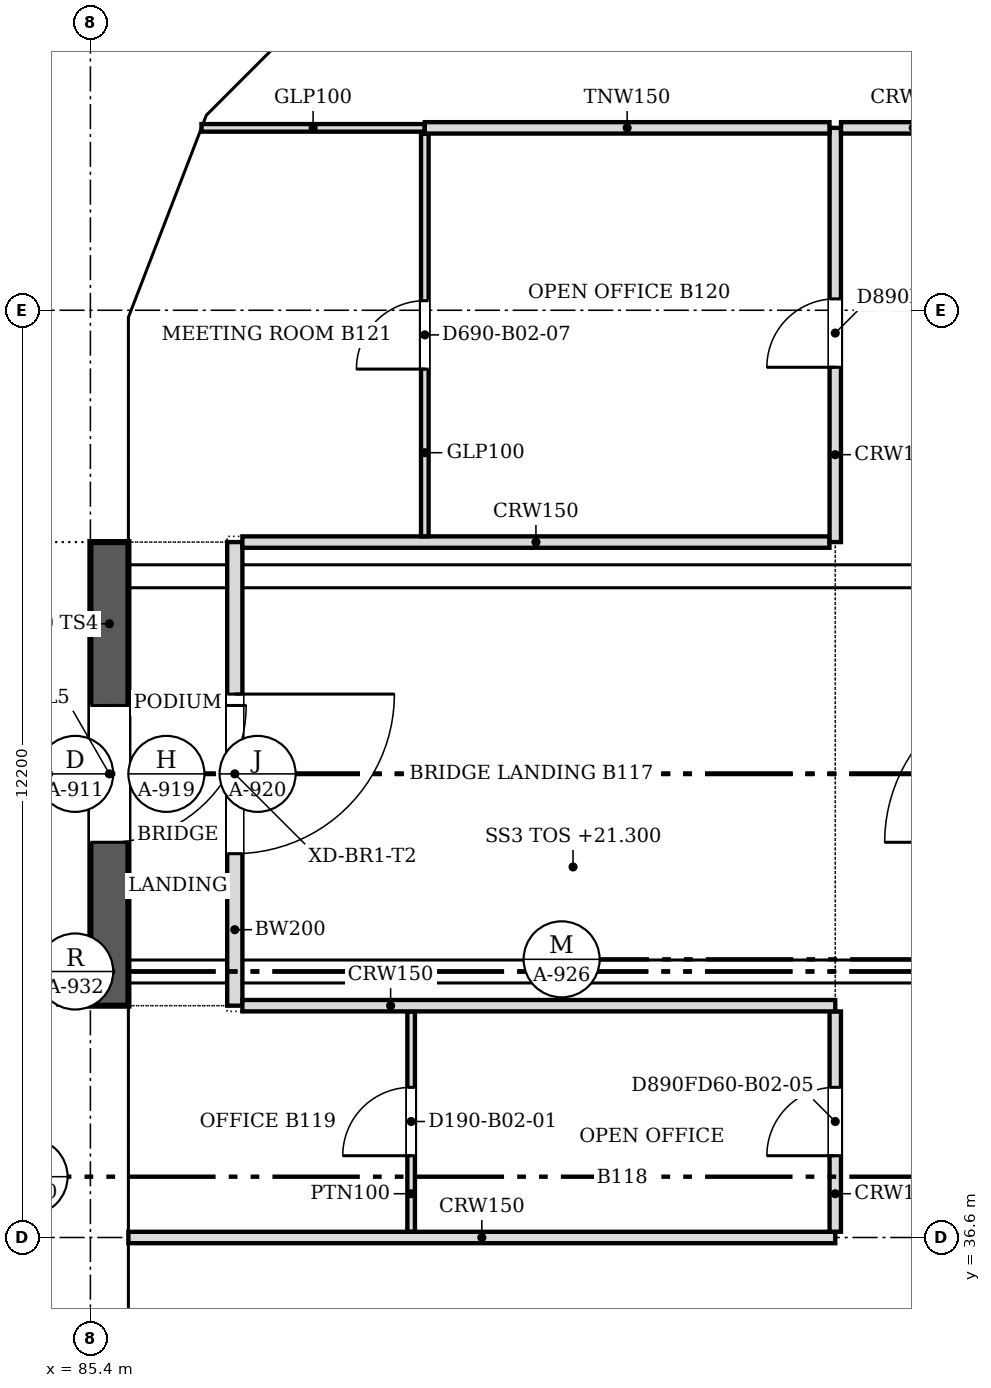
"""IFC4 building model, lengths in metres.
Left out: names, types, materials, properties, quantities, classifications, styles, units other than length and angle.
Written with IfcOpenShell. Run it as: python <this file> out.ifc"""

import sys

from ifc_helpers import new_model, si_unit, direction, frame, frame_2d, origin, place, context, subcontext, project, spatial, polyline, rectangle, outline, extrude, faceted_brep, source, transform, mapped, element, fill, save


model = new_model("IFC4")
c1 = context("Model", 3, precision=1e-05, world=origin(), true_north=direction((0.0, 1.0)))
c2 = subcontext(c1, "Body", "Model", "MODEL_VIEW")
j1 = project(units=[si_unit("LENGTHUNIT", "METRE"), si_unit("PLANEANGLEUNIT", "RADIAN")], contexts=[c1])
p1 = place(None, origin())
s1 = spatial("IfcSite", under=j1, at=p1, CompositionType="ELEMENT")
p2 = place(p1, origin())
s2 = spatial("IfcBuilding", under=s1, at=p2, CompositionType="ELEMENT")
p3 = place(p2, frame((0.0, 0.0, 21.3)))
s3 = spatial("IfcBuildingStorey", under=s2, at=p3, CompositionType="ELEMENT", Elevation=21.3)
m1 = source(origin(), c2, "Body", "Brep", [
    faceted_brep([(0.053, -0.25, 0.0), (2.997, -0.25, 4.5), (0.053, -0.25, 9.0), (0.0, -0.25, 8.919), (0.0, -0.25, 0.081), (0.106, 0.25, 8.919), (2.944, 0.25, 4.581), (2.944, 0.25, 4.419), (0.106, 0.25, 0.081), (2.997, 0.0, 4.5), (0.053, 0.0, 0.0), (0.053, 0.0, 9.0)], [[[0, 1, 2, 3, 4]], [[5, 6, 7, 8]], [[8, 7, 9, 1, 0, 10]], [[6, 5, 11, 2, 1, 9]], [[3, 2, 11]], [[10, 0, 4]], [[8, 10, 4, 3, 11, 5]], [[9, 7, 6]]]),
])
p4 = place(p3, frame((88.831, 53.625, -4.5), z_axis=(0.0, 0.0, 1.0), x_axis=(-0.707147509625, -0.707066050402, 0.0)))
e1 = element("IfcWall", 1, at=p4, inside=s3, PredefinedType="SOLIDWALL", context=c2, shape_type="MappedRepresentation", body=[
    mapped(m1, transform((0.0, 0.0, 0.0), scale=1.0)),
])
m2 = source(origin(), c2, "Body", "SweptSolid", [
    extrude(outline(polyline([(0.253, 0.762), (2.698, 4.5), (0.253, 8.238), (0.253, 0.762)])), frame((0.0, 0.26, 0.0), z_axis=(0.0, -1.0, 0.0), x_axis=(1.0, 0.0, 0.0)), (0.0, 0.0, 1.0), 0.52),
])
p5 = place(p4, origin())
e2 = element("IfcOpeningElement", 2, at=p5, cuts=e1, PredefinedType="OPENING", context=c2, shape_type="MappedRepresentation", body=[
    mapped(m2, transform((0.0, 0.0, 0.0), scale=1.0)),
])
m3 = source(origin(), c2, "Body", "Brep", [
    faceted_brep([(2.95, -0.25, 0.0), (2.997, -0.25, 0.07), (2.997, -0.25, 8.93), (2.95, -0.25, 9.0), (0.0, -0.25, 4.5), (0.053, 0.25, 4.581), (2.904, 0.25, 8.929), (2.904, 0.25, 0.071), (0.053, 0.25, 4.419), (2.95, 0.0, 0.0), (2.95, 0.0, 9.0), (0.0, 0.0, 4.5)], [[[0, 1, 2, 3, 4]], [[5, 6, 7, 8]], [[1, 0, 9]], [[10, 3, 2]], [[6, 5, 11, 4, 3, 10]], [[8, 7, 9, 0, 4, 11]], [[8, 11, 5]], [[1, 9, 7, 6, 10, 2]]]),
])
p6 = place(p3, frame((86.712, 51.506, -4.5), z_axis=(0.0, 0.0, 1.0), x_axis=(-0.359874094142, -0.933000876937, 0.0)))
e3 = element("IfcWall", 3, at=p6, inside=s3, PredefinedType="SOLIDWALL", context=c2, shape_type="MappedRepresentation", body=[
    mapped(m3, transform((0.0, 0.0, 0.0), scale=1.0)),
])
m4 = source(origin(), c2, "Body", "SweptSolid", [
    extrude(outline(polyline([(2.75, 8.239), (0.299, 4.5), (2.75, 0.761), (2.75, 8.239)])), frame((0.0, 0.26, 0.0), z_axis=(0.0, -1.0, 0.0), x_axis=(1.0, 0.0, 0.0)), (0.0, 0.0, 1.0), 0.52),
])
p7 = place(p6, origin())
e4 = element("IfcOpeningElement", 4, at=p7, cuts=e3, PredefinedType="OPENING", context=c2, shape_type="MappedRepresentation", body=[
    mapped(m4, transform((0.0, 0.0, 0.0), scale=1.0)),
])
m5 = source(origin(), c2, "Body", "Brep", [
    faceted_brep([(0.047, -0.25, 0.0), (3.05, -0.25, 4.5), (0.047, -0.25, 9.0), (0.0, -0.25, 8.929), (0.0, -0.25, 0.071), (0.093, 0.25, 8.93), (3.05, 0.25, 4.5), (0.093, 0.25, 0.07), (0.047, 0.0, 0.0), (0.047, 0.0, 9.0)], [[[0, 1, 2, 3, 4]], [[5, 6, 7]], [[7, 6, 1, 0, 8]], [[6, 5, 9, 2, 1]], [[3, 2, 9]], [[8, 0, 4]], [[7, 8, 4, 3, 9, 5]]]),
])
p8 = place(p3, frame((85.65, 48.8, -4.5), z_axis=(0.0, 0.0, 1.0), x_axis=(0.0, -1.0, 0.0)))
e5 = element("IfcWall", 5, at=p8, inside=s3, PredefinedType="SOLIDWALL", context=c2, shape_type="MappedRepresentation", body=[
    mapped(m5, transform((0.0, 0.0, 0.0), scale=1.0)),
])
m6 = source(origin(), c2, "Body", "SweptSolid", [
    extrude(outline(polyline([(0.247, 0.75), (2.75, 4.5), (0.247, 8.25), (0.247, 0.75)])), frame((0.0, 0.26, 0.0), z_axis=(0.0, -1.0, 0.0), x_axis=(1.0, 0.0, 0.0)), (0.0, 0.0, 1.0), 0.52),
])
p9 = place(p8, origin())
e6 = element("IfcOpeningElement", 6, at=p9, cuts=e5, PredefinedType="OPENING", context=c2, shape_type="MappedRepresentation", body=[
    mapped(m6, transform((0.0, 0.0, 0.0), scale=1.0)),
])
m7 = source(origin(), c2, "Body", "SweptSolid", [
    extrude(outline(polyline([(3.05, 0.0), (6.1, 4.5), (3.05, 9.0), (0.0, 4.5), (3.05, 0.0)])), frame((0.0, 0.25, 0.0), z_axis=(0.0, -1.0, 0.0), x_axis=(1.0, 0.0, 0.0)), (0.0, 0.0, 1.0), 0.5),
])
p10 = place(p3, frame((85.65, 45.75, -4.5), z_axis=(0.0, 0.0, 1.0), x_axis=(0.0, -1.0, 0.0)))
e7 = element("IfcWall", 7, at=p10, inside=s3, PredefinedType="SOLIDWALL", context=c2, shape_type="MappedRepresentation", body=[
    mapped(m7, transform((0.0, 0.0, 0.0), scale=1.0)),
])
m8 = source(origin(), c2, "Body", "SweptSolid", [
    extrude(rectangle(XDim=1.8, YDim=2.4, at=frame_2d((0.9, 1.2))), frame((0.0, 0.26, 0.0), z_axis=(0.0, -1.0, 0.0), x_axis=(1.0, 0.0, 0.0)), (0.0, 0.0, 1.0), 0.52),
])
p11 = place(p10, frame((2.15, 0.0, 4.5)))
e8 = element("IfcOpeningElement", 8, at=p11, cuts=e7, PredefinedType="OPENING", context=c2, shape_type="MappedRepresentation", body=[
    mapped(m8, transform((0.0, 0.0, 0.0), scale=1.0)),
])
m9 = source(origin(), c2, "Body", "Brep", [
    faceted_brep([(3.05, -0.25, 0.0), (6.1, -0.25, 4.5), (6.1, -0.25, 4.5), (3.05, -0.25, 9.0), (0.0, -0.25, 4.5), (0.0, 0.25, 4.5), (3.05, 0.25, 9.0), (6.1, 0.25, 4.5), (6.1, 0.25, 4.5), (3.05, 0.25, 0.0)], [[[0, 1, 2, 3, 4]], [[5, 6, 7, 8, 9]], [[9, 8, 1, 0]], [[7, 6, 3, 2]], [[6, 5, 4, 3]], [[5, 9, 0, 4]], [[1, 8, 7, 2]]]),
])
p12 = place(p3, frame((85.65, 39.65, -4.5), z_axis=(0.0, 0.0, 1.0), x_axis=(0.0, -1.0, 0.0)))
e9 = element("IfcWall", 9, at=p12, inside=s3, PredefinedType="SOLIDWALL", context=c2, shape_type="MappedRepresentation", body=[
    mapped(m9, transform((0.0, 0.0, 0.0), scale=1.0)),
])
m10 = source(origin(), c2, "Body", "SweptSolid", [
    extrude(outline(polyline([(3.05, 0.446), (5.798, 4.5), (3.05, 8.554), (0.302, 4.5), (3.05, 0.446)])), frame((0.0, 0.26, 0.0), z_axis=(0.0, -1.0, 0.0), x_axis=(1.0, 0.0, 0.0)), (0.0, 0.0, 1.0), 0.52),
])
p13 = place(p12, origin())
e10 = element("IfcOpeningElement", 10, at=p13, cuts=e9, PredefinedType="OPENING", context=c2, shape_type="MappedRepresentation", body=[
    mapped(m10, transform((0.0, 0.0, 0.0), scale=1.0)),
])
m11 = source(origin(), c2, "Body", "Brep", [
    faceted_brep([(2.944, -0.25, 0.0), (2.997, -0.25, 0.081), (2.997, -0.25, 4.5), (0.0, -0.25, 4.5), (0.053, 0.25, 4.5), (2.891, 0.25, 4.5), (2.891, 0.25, 0.081), (0.053, 0.25, 4.419), (2.944, 0.0, 0.0), (0.0, 0.0, 4.5)], [[[0, 1, 2, 3]], [[4, 5, 6, 7]], [[1, 0, 8]], [[5, 4, 9, 3, 2]], [[7, 6, 8, 0, 3, 9]], [[7, 9, 4]], [[1, 8, 6, 5, 2]]]),
])
p14 = place(p3, frame((88.794, 53.588, 0.0), z_axis=(0.0, 0.0, 1.0), x_axis=(-0.707066050402, -0.707147509625, 0.0)))
e11 = element("IfcWall", 11, at=p14, inside=s3, PredefinedType="SOLIDWALL", context=c2, shape_type="MappedRepresentation", body=[
    mapped(m11, transform((0.0, 0.0, 0.0), scale=1.0)),
])
m12 = source(origin(), c2, "Body", "SweptSolid", [
    extrude(outline(polyline([(2.744, 4.25), (0.462, 4.25), (2.744, 0.762), (2.744, 4.25)])), frame((0.0, 0.26, 0.0), z_axis=(0.0, -1.0, 0.0), x_axis=(1.0, 0.0, 0.0)), (0.0, 0.0, 1.0), 0.52),
])
p15 = place(p14, origin())
e12 = element("IfcOpeningElement", 12, at=p15, cuts=e11, PredefinedType="OPENING", context=c2, shape_type="MappedRepresentation", body=[
    mapped(m12, transform((0.0, 0.0, 0.0), scale=1.0)),
])
m13 = source(origin(), c2, "Body", "Brep", [
    faceted_brep([(0.053, -0.25, 0.0), (3.003, -0.25, 4.5), (0.0, -0.25, 4.5), (0.0, -0.25, 0.081), (0.106, 0.25, 4.5), (2.957, 0.25, 4.5), (2.957, 0.25, 4.429), (0.106, 0.25, 0.081), (3.003, 0.0, 4.5), (0.053, 0.0, 0.0)], [[[0, 1, 2, 3]], [[4, 5, 6, 7]], [[7, 6, 8, 1, 0, 9]], [[5, 4, 2, 1, 8]], [[9, 0, 3]], [[7, 9, 3, 2, 4]], [[6, 5, 8]]]),
])
p16 = place(p3, frame((86.731, 51.556, 0.0), z_axis=(0.0, 0.0, 1.0), x_axis=(-0.359855894603, -0.933007896601, 0.0)))
e13 = element("IfcWall", 13, at=p16, inside=s3, PredefinedType="SOLIDWALL", context=c2, shape_type="MappedRepresentation", body=[
    mapped(m13, transform((0.0, 0.0, 0.0), scale=1.0)),
])
m14 = source(origin(), c2, "Body", "SweptSolid", [
    extrude(outline(polyline([(0.253, 0.761), (2.541, 4.25), (0.253, 4.25), (0.253, 0.761)])), frame((0.0, 0.26, 0.0), z_axis=(0.0, -1.0, 0.0), x_axis=(1.0, 0.0, 0.0)), (0.0, 0.0, 1.0), 0.52),
])
p17 = place(p16, origin())
e14 = element("IfcOpeningElement", 14, at=p17, cuts=e13, PredefinedType="OPENING", context=c2, shape_type="MappedRepresentation", body=[
    mapped(m14, transform((0.0, 0.0, 0.0), scale=1.0)),
])
m15 = source(origin(), c2, "Body", "Brep", [
    faceted_brep([(3.003, -0.25, 0.0), (4.803, -0.25, 2.656), (4.803, -0.25, 4.5), (0.0, -0.25, 4.5), (0.047, 0.25, 4.5), (4.803, 0.25, 4.5), (4.803, 0.25, 2.656), (3.003, 0.25, 0.0), (0.047, 0.25, 4.43), (0.0, 0.0, 4.5)], [[[0, 1, 2, 3]], [[4, 5, 6, 7, 8]], [[7, 6, 1, 0]], [[5, 4, 9, 3, 2]], [[8, 7, 0, 3, 9]], [[8, 9, 4]], [[1, 6, 5, 2]]]),
])
p18 = place(p3, frame((85.65, 48.753, 0.0), z_axis=(0.0, 0.0, 1.0), x_axis=(0.0, -1.0, 0.0)))
e15 = element("IfcWall", 15, at=p18, inside=s3, PredefinedType="SOLIDWALL", context=c2, shape_type="MappedRepresentation", body=[
    mapped(m15, transform((0.0, 0.0, 0.0), scale=1.0)),
])
m16 = source(origin(), c2, "Body", "SweptSolid", [
    extrude(outline(polyline([(3.005, 0.448), (4.803, 3.101), (4.803, 4.25), (0.468, 4.25), (3.005, 0.448)])), frame((0.0, 0.26, 0.0), z_axis=(0.0, -1.0, 0.0), x_axis=(1.0, 0.0, 0.0)), (0.0, 0.0, 1.0), 0.52),
])
p19 = place(p18, origin())
e16 = element("IfcOpeningElement", 16, at=p19, cuts=e15, PredefinedType="OPENING", context=c2, shape_type="MappedRepresentation", body=[
    mapped(m16, transform((0.0, 0.0, 0.0), scale=1.0)),
])
m17 = source(origin(), c2, "Body", "Brep", [
    faceted_brep([(1.8, -0.25, 0.0), (4.85, -0.25, 4.5), (4.85, -0.25, 4.5), (0.0, -0.25, 4.5), (0.0, -0.25, 2.656), (0.0, 0.25, 2.656), (0.0, 0.25, 4.5), (4.85, 0.25, 4.5), (4.85, 0.25, 4.5), (1.8, 0.25, 0.0)], [[[0, 1, 2, 3, 4]], [[5, 6, 7, 8, 9]], [[9, 8, 1, 0]], [[7, 6, 3, 2]], [[6, 5, 4, 3]], [[5, 9, 0, 4]], [[1, 8, 7, 2]]]),
])
p20 = place(p3, frame((85.65, 41.45, 0.0), z_axis=(0.0, 0.0, 1.0), x_axis=(0.0, -1.0, 0.0)))
e17 = element("IfcWall", 17, at=p20, inside=s3, PredefinedType="SOLIDWALL", context=c2, shape_type="MappedRepresentation", body=[
    mapped(m17, transform((0.0, 0.0, 0.0), scale=1.0)),
])
m18 = source(origin(), c2, "Body", "SweptSolid", [
    extrude(outline(polyline([(1.8, 0.446), (4.379, 4.25), (0.0, 4.25), (0.0, 3.101), (1.8, 0.446)])), frame((0.0, 0.26, 0.0), z_axis=(0.0, -1.0, 0.0), x_axis=(1.0, 0.0, 0.0)), (0.0, 0.0, 1.0), 0.52),
])
p21 = place(p20, origin())
e18 = element("IfcOpeningElement", 18, at=p21, cuts=e17, PredefinedType="OPENING", context=c2, shape_type="MappedRepresentation", body=[
    mapped(m18, transform((0.0, 0.0, 0.0), scale=1.0)),
])
m19 = source(origin(), c2, "Body", "SweptSolid", [
    extrude(outline(polyline([(3.05, 0.0), (6.1, 4.5), (0.0, 4.5), (3.05, 0.0)])), frame((0.0, 0.25, 0.0), z_axis=(0.0, -1.0, 0.0), x_axis=(1.0, 0.0, 0.0)), (0.0, 0.0, 1.0), 0.5),
])
p22 = place(p3, frame((85.65, 36.6, 0.0), z_axis=(0.0, 0.0, 1.0), x_axis=(0.0, -1.0, 0.0)))
e19 = element("IfcWall", 19, at=p22, inside=s3, PredefinedType="SOLIDWALL", context=c2, shape_type="MappedRepresentation", body=[
    mapped(m19, transform((0.0, 0.0, 0.0), scale=1.0)),
])
m20 = source(origin(), c2, "Body", "SweptSolid", [
    extrude(outline(polyline([(3.05, 0.446), (5.629, 4.25), (0.471, 4.25), (3.05, 0.446)])), frame((0.0, 0.26, 0.0), z_axis=(0.0, -1.0, 0.0), x_axis=(1.0, 0.0, 0.0)), (0.0, 0.0, 1.0), 0.52),
])
p23 = place(p22, origin())
e20 = element("IfcOpeningElement", 20, at=p23, cuts=e19, PredefinedType="OPENING", context=c2, shape_type="MappedRepresentation", body=[
    mapped(m20, transform((0.0, 0.0, 0.0), scale=1.0)),
])
p24 = place(p3, frame((87.3, 45.75, 0.0), z_axis=(0.0, 0.0, 1.0), x_axis=(0.0, -1.0, 0.0)))
e21 = element("IfcWall", 21, at=p24, inside=s3, PredefinedType="PARTITIONING", context=c2, shape_type="SweptSolid", body=[
    extrude(rectangle(XDim=6.1, YDim=0.2, at=frame_2d((3.05, 0.0))), origin(), (0.0, 0.0, 1.0), 3.767),
])
m21 = source(origin(), c2, "Body", "SweptSolid", [
    extrude(rectangle(XDim=2.1, YDim=2.1, at=frame_2d((1.05, 1.05))), frame((0.0, 0.11, 0.0), z_axis=(0.0, -1.0, 0.0), x_axis=(1.0, 0.0, 0.0)), (0.0, 0.0, 1.0), 0.22),
])
p25 = place(p24, frame((2.0, 0.0, 0.0)))
e22 = element("IfcOpeningElement", 22, at=p25, cuts=e21, PredefinedType="OPENING", context=c2, shape_type="MappedRepresentation", body=[
    mapped(m21, transform((0.0, 0.0, 0.0), scale=1.0)),
])
p26 = place(p3, frame((85.9, 36.6, 0.0), z_axis=(0.0, 0.0, 1.0), x_axis=(1.0, 0.0, 0.0)))
e23 = element("IfcWall", 23, at=p26, inside=s3, PredefinedType="PARTITIONING", context=c2, shape_type="SweptSolid", body=[
    extrude(rectangle(XDim=9.3, YDim=0.15, at=frame_2d((4.65, 0.0))), origin(), (0.0, 0.0, 1.0), 3.767),
])
p27 = place(p3, frame((89.62, 36.676, 0.0), z_axis=(0.0, 0.0, 1.0), x_axis=(0.0, 1.0, 0.0)))
e24 = element("IfcWall", 24, at=p27, inside=s3, PredefinedType="PARTITIONING", context=c2, shape_type="SweptSolid", body=[
    extrude(rectangle(XDim=2.898, YDim=0.1, at=frame_2d((1.449, 0.0))), origin(), (0.0, 0.0, 1.0), 3.767),
])
m22 = source(origin(), c2, "Body", "SweptSolid", [
    extrude(rectangle(XDim=0.9, YDim=2.1, at=frame_2d((0.45, 1.05))), frame((0.0, 0.06, 0.0), z_axis=(0.0, -1.0, 0.0), x_axis=(1.0, 0.0, 0.0)), (0.0, 0.0, 1.0), 0.12),
])
p28 = place(p27, frame((1.0, 0.0, 0.0)))
e25 = element("IfcOpeningElement", 25, at=p28, cuts=e24, PredefinedType="OPENING", context=c2, shape_type="MappedRepresentation", body=[
    mapped(m22, transform((0.0, 0.0, 0.0), scale=1.0)),
])
p29 = place(p3, frame((95.2, 36.676, 0.0), z_axis=(0.0, 0.0, 1.0), x_axis=(0.0, 1.0, 0.0)))
e26 = element("IfcWall", 26, at=p29, inside=s3, PredefinedType="PARTITIONING", context=c2, shape_type="SweptSolid", body=[
    extrude(rectangle(XDim=2.898, YDim=0.15, at=frame_2d((1.449, 0.0))), origin(), (0.0, 0.0, 1.0), 3.767),
])
m23 = source(origin(), c2, "Body", "SweptSolid", [
    extrude(rectangle(XDim=0.9, YDim=2.1, at=frame_2d((0.45, 1.05))), frame((0.0, 0.085, 0.0), z_axis=(0.0, -1.0, 0.0), x_axis=(1.0, 0.0, 0.0)), (0.0, 0.0, 1.0), 0.17),
])
p30 = place(p29, frame((1.0, 0.0, 0.0)))
e27 = element("IfcOpeningElement", 27, at=p30, cuts=e26, PredefinedType="OPENING", context=c2, shape_type="MappedRepresentation", body=[
    mapped(m23, transform((0.0, 0.0, 0.0), scale=1.0)),
])
p31 = place(p3, frame((87.4, 39.65, 0.0), z_axis=(0.0, 0.0, 1.0), x_axis=(1.0, 0.0, 0.0)))
e28 = element("IfcWall", 28, at=p31, inside=s3, PredefinedType="PARTITIONING", context=c2, shape_type="SweptSolid", body=[
    extrude(rectangle(XDim=7.8, YDim=0.15, at=frame_2d((3.9, 0.0))), origin(), (0.0, 0.0, 1.0), 3.767),
])
p32 = place(p3, frame((87.4, 45.75, 0.0), z_axis=(0.0, 0.0, 1.0), x_axis=(1.0, 0.0, 0.0)))
e29 = element("IfcWall", 29, at=p32, inside=s3, PredefinedType="PARTITIONING", context=c2, shape_type="SweptSolid", body=[
    extrude(rectangle(XDim=7.724, YDim=0.15, at=frame_2d((3.862, 0.0))), origin(), (0.0, 0.0, 1.0), 3.767),
])
p33 = place(p3, frame((95.2, 45.75, 0.0), z_axis=(0.0, 0.0, 1.0), x_axis=(0.0, 1.0, 0.0)))
e30 = element("IfcWall", 30, at=p33, inside=s3, PredefinedType="PARTITIONING", context=c2, shape_type="SweptSolid", body=[
    extrude(rectangle(XDim=5.45, YDim=0.15, at=frame_2d((2.725, 0.0))), origin(), (0.0, 0.0, 1.0), 3.767),
])
p34 = place(p33, frame((2.3, 0.0, 0.0)))
e31 = element("IfcOpeningElement", 31, at=p34, cuts=e30, PredefinedType="OPENING", context=c2, shape_type="MappedRepresentation", body=[
    mapped(m23, transform((0.0, 0.0, 0.0), scale=1.0)),
])
p35 = place(p3, frame((89.8, 45.826, 0.0), z_axis=(0.0, 0.0, 1.0), x_axis=(0.0, 1.0, 0.0)))
e32 = element("IfcWall", 32, at=p35, inside=s3, PredefinedType="PARTITIONING", context=c2, shape_type="SweptSolid", body=[
    extrude(rectangle(XDim=5.298, YDim=0.1, at=frame_2d((2.649, 0.0))), origin(), (0.0, 0.0, 1.0), 3.767),
])
p36 = place(p35, frame((2.2, 0.0, 0.0)))
e33 = element("IfcOpeningElement", 33, at=p36, cuts=e32, PredefinedType="OPENING", context=c2, shape_type="MappedRepresentation", body=[
    mapped(m22, transform((0.0, 0.0, 0.0), scale=1.0)),
])
p37 = place(p3, frame((86.862, 51.2, 0.0), z_axis=(0.0, 0.0, 1.0), x_axis=(1.0, 0.0, 0.0)))
e34 = element("IfcWall", 34, at=p37, inside=s3, PredefinedType="PARTITIONING", context=c2, shape_type="SweptSolid", body=[
    extrude(rectangle(XDim=2.937, YDim=0.1, at=frame_2d((1.469, 0.0))), origin(), (0.0, 0.0, 1.0), 3.767),
])
p38 = place(p3, frame((89.8, 51.2, 0.0), z_axis=(0.0, 0.0, 1.0), x_axis=(1.0, 0.0, 0.0)))
e35 = element("IfcWall", 35, at=p38, inside=s3, PredefinedType="PARTITIONING", context=c2, shape_type="SweptSolid", body=[
    extrude(rectangle(XDim=5.324, YDim=0.15, at=frame_2d((2.662, 0.0))), origin(), (0.0, 0.0, 1.0), 3.767),
])
p39 = place(p3, frame((95.276, 51.2, 0.0), z_axis=(0.0, 0.0, 1.0), x_axis=(1.0, 0.0, 0.0)))
e36 = element("IfcWall", 36, at=p39, inside=s3, PredefinedType="PARTITIONING", context=c2, shape_type="SweptSolid", body=[
    extrude(rectangle(XDim=4.724, YDim=0.15, at=frame_2d((2.362, 0.0))), origin(), (0.0, 0.0, 1.0), 3.767),
])
m24 = source(origin(), c2, "Body", "SweptSolid", [
    extrude(rectangle(XDim=1.0, YDim=2.1, at=frame_2d((0.5, 1.05))), frame((0.0, 0.085, 0.0), z_axis=(0.0, -1.0, 0.0), x_axis=(1.0, 0.0, 0.0)), (0.0, 0.0, 1.0), 0.17),
])
p40 = place(p39, frame((1.9, 0.0, 0.0)))
e37 = element("IfcOpeningElement", 37, at=p40, cuts=e36, PredefinedType="OPENING", context=c2, shape_type="MappedRepresentation", body=[
    mapped(m24, transform((0.0, 0.0, 0.0), scale=1.0)),
])
m25 = source(origin(), c2, "Body", "SweptSolid", [
    extrude(rectangle(XDim=1.8, YDim=2.4, at=frame_2d((0.9, 1.2))), frame((0.0, 0.03, 0.0), z_axis=(0.0, -1.0, 0.0), x_axis=(1.0, 0.0, 0.0)), (0.0, 0.0, 1.0), 0.06),
])
p41 = place(p11, origin())
e38 = element("IfcDoor", 38, at=p41, inside=s3, OperationType="DOUBLE_DOOR_SINGLE_SWING", PredefinedType="DOOR", context=c2, shape_type="MappedRepresentation", body=[
    mapped(m25, transform((0.0, 0.0, 0.0), scale=1.0)),
])
fill(e8, e38)
m26 = source(origin(), c2, "Body", "SweptSolid", [
    extrude(rectangle(XDim=2.1, YDim=2.1, at=frame_2d((1.05, 1.05))), frame((0.0, 0.025, 0.0), z_axis=(0.0, -1.0, 0.0), x_axis=(1.0, 0.0, 0.0)), (0.0, 0.0, 1.0), 0.05),
])
p42 = place(p25, origin())
e39 = element("IfcDoor", 39, at=p42, inside=s3, OperationType="DOUBLE_DOOR_SINGLE_SWING", PredefinedType="DOOR", context=c2, shape_type="MappedRepresentation", body=[
    mapped(m26, transform((0.0, 0.0, 0.0), scale=1.0)),
])
fill(e22, e39)
m27 = source(origin(), c2, "Body", "SweptSolid", [
    extrude(rectangle(XDim=0.9, YDim=2.1, at=frame_2d((0.45, 1.05))), frame((0.0, 0.025, 0.0), z_axis=(0.0, -1.0, 0.0), x_axis=(1.0, 0.0, 0.0)), (0.0, 0.0, 1.0), 0.05),
])
p43 = place(p28, origin())
e40 = element("IfcDoor", 40, at=p43, inside=s3, OperationType="SINGLE_SWING_LEFT", PredefinedType="DOOR", context=c2, shape_type="MappedRepresentation", body=[
    mapped(m27, transform((0.0, 0.0, 0.0), scale=1.0)),
])
fill(e25, e40)
p44 = place(p36, origin())
e41 = element("IfcDoor", 41, at=p44, inside=s3, OperationType="SINGLE_SWING_LEFT", PredefinedType="DOOR", context=c2, shape_type="MappedRepresentation", body=[
    mapped(m27, transform((0.0, 0.0, 0.0), scale=1.0)),
])
fill(e33, e41)
p45 = place(p34, origin())
e42 = element("IfcDoor", 42, at=p45, inside=s3, OperationType="SINGLE_SWING_LEFT", PredefinedType="DOOR", context=c2, shape_type="MappedRepresentation", body=[
    mapped(m27, transform((0.0, 0.0, 0.0), scale=1.0)),
])
fill(e31, e42)
p46 = place(p30, origin())
e43 = element("IfcDoor", 43, at=p46, inside=s3, OperationType="SINGLE_SWING_LEFT", PredefinedType="DOOR", context=c2, shape_type="MappedRepresentation", body=[
    mapped(m27, transform((0.0, 0.0, 0.0), scale=1.0)),
])
fill(e27, e43)
save(model, sys.argv[1])
